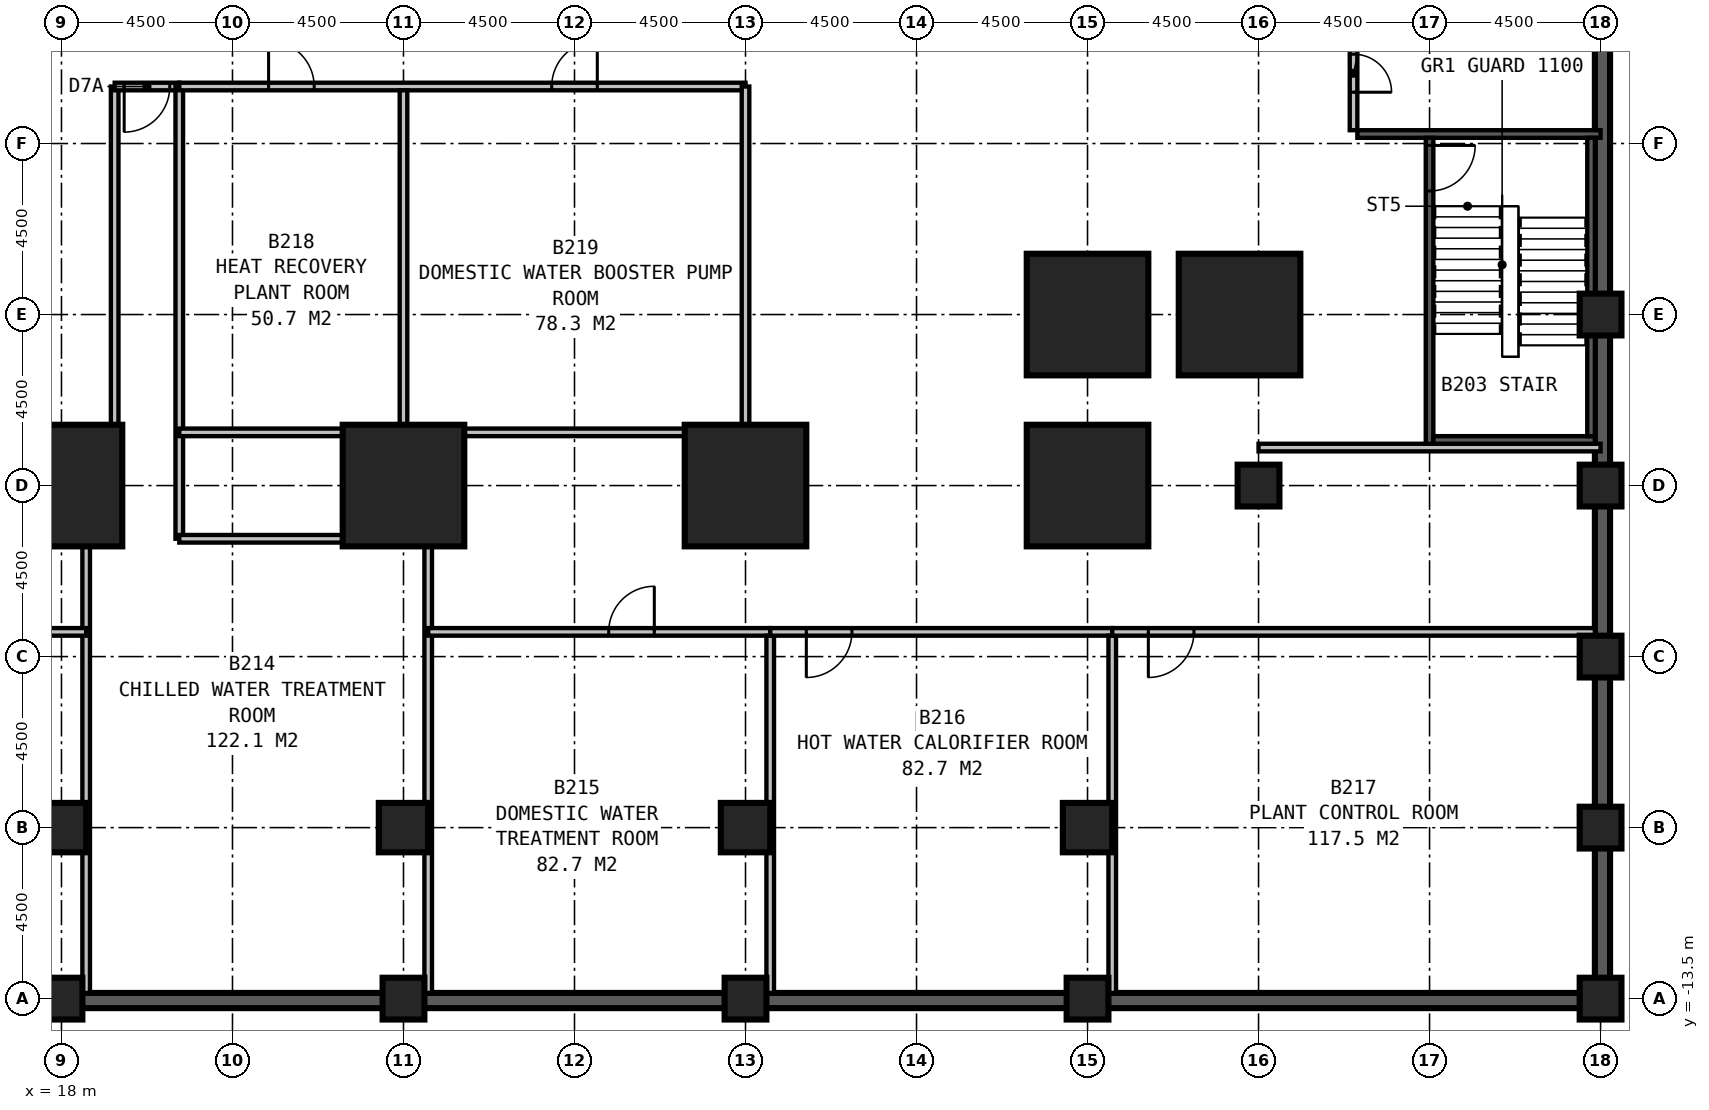
"""IFC4 building model, lengths in metres.
Left out: names, types, materials, properties, quantities, classifications, styles, units other than length and angle.
Written with IfcOpenShell. Run it as: python <this file> out.ifc"""

import sys

from ifc_helpers import new_model, si_unit, direction, frame, frame_2d, origin, origin_2d, place, context, subcontext, project, spatial, rectangle, extrude, element, fill, save


model = new_model("IFC4")
c1 = context("Model", 3, precision=1e-05, world=origin(), true_north=direction((0.0, 1.0)))
c2 = subcontext(c1, "Body", "Model", "MODEL_VIEW")
j1 = project(units=[si_unit("LENGTHUNIT", "METRE"), si_unit("PLANEANGLEUNIT", "RADIAN")], contexts=[c1])
p1 = place(None, origin())
s1 = spatial("IfcSite", under=j1, at=p1, CompositionType="ELEMENT")
p2 = place(p1, origin())
s2 = spatial("IfcBuilding", under=s1, at=p2, CompositionType="ELEMENT")
p3 = place(p2, frame((0.0, 0.0, -9.0)))
s3 = spatial("IfcBuildingStorey", under=s2, at=p3, CompositionType="ELEMENT", Elevation=-9.0)
for number, where, z_axis, x_axis in (
    (1, (18.0, 0.0, 0.0), (0.0, 0.0, 1.0), (1.0, 0.0, 0.0)),
    (2, (27.0, 0.0, 0.0), (0.0, 0.0, 1.0), (1.0, 0.0, 0.0)),
    (3, (36.0, 0.0, 0.0), (0.0, 0.0, 1.0), (1.0, 0.0, 0.0)),
    (4, (45.0, 0.0, 0.0), (0.0, 0.0, 1.0), (1.0, 0.0, 0.0)),
    (5, (45.0, 4.5, 0.0), (0.0, 0.0, 1.0), (1.0, 0.0, 0.0)),
    (6, (49.0, 4.5, 0.0), (0.0, 0.0, 1.0), (1.0, 0.0, 0.0)),
):
    element("IfcColumn", number, at=place(p3, frame(where, z_axis=z_axis, x_axis=x_axis)), inside=s3, PredefinedType="COLUMN", context=c2, shape_type="SweptSolid", body=[
        extrude(rectangle(XDim=3.2, YDim=3.2, at=origin_2d()), origin(), (0.0, 0.0, 1.0), 4.5),
    ])
for number, where, z_axis, x_axis in (
    (7, (58.5, -13.5, -0.6), (0.0, 0.0, 1.0), (1.0, 0.0, 0.0)),
    (8, (58.5, -4.5, -0.6), (0.0, 0.0, 1.0), (1.0, 0.0, 0.0)),
    (9, (58.5, 4.5, -0.6), (0.0, 0.0, 1.0), (1.0, 0.0, 0.0)),
    (10, (58.5, 0.0, -0.6), (0.0, 0.0, 1.0), (1.0, 0.0, 0.0)),
    (11, (18.0, -13.5, -0.6), (0.0, 0.0, 1.0), (1.0, 0.0, 0.0)),
    (12, (27.0, -13.5, -0.6), (0.0, 0.0, 1.0), (1.0, 0.0, 0.0)),
    (13, (36.0, -13.5, -0.6), (0.0, 0.0, 1.0), (1.0, 0.0, 0.0)),
    (14, (45.0, -13.5, -0.6), (0.0, 0.0, 1.0), (1.0, 0.0, 0.0)),
):
    element("IfcColumn", number, at=place(p3, frame(where, z_axis=z_axis, x_axis=x_axis)), inside=s3, PredefinedType="COLUMN", context=c2, shape_type="SweptSolid", body=[
        extrude(rectangle(XDim=1.1, YDim=1.1, at=origin_2d()), origin(), (0.0, 0.0, 1.0), 5.1),
    ])
for number, where, z_axis, x_axis in (
    (15, (18.0, -9.0, -0.6), (0.0, 0.0, 1.0), (1.0, 0.0, 0.0)),
    (16, (27.0, -9.0, -0.6), (0.0, 0.0, 1.0), (1.0, 0.0, 0.0)),
    (17, (36.0, -9.0, -0.6), (0.0, 0.0, 1.0), (1.0, 0.0, 0.0)),
    (18, (45.0, -9.0, -0.6), (0.0, 0.0, 1.0), (1.0, 0.0, 0.0)),
):
    element("IfcColumn", number, at=place(p3, frame(where, z_axis=z_axis, x_axis=x_axis)), inside=s3, PredefinedType="COLUMN", context=c2, shape_type="SweptSolid", body=[
        extrude(rectangle(XDim=1.3, YDim=1.3, at=origin_2d()), origin(), (0.0, 0.0, 1.0), 5.1),
    ])
for number, where, z_axis, x_axis in (
    (19, (58.5, -9.0, -0.6), (0.0, 0.0, 1.0), (1.0, 0.0, 0.0)),
    (20, (49.5, 0.0, -0.6), (0.0, 0.0, 1.0), (1.0, 0.0, 0.0)),
):
    element("IfcColumn", number, at=place(p3, frame(where, z_axis=z_axis, x_axis=x_axis)), inside=s3, PredefinedType="COLUMN", context=c2, shape_type="SweptSolid", body=[
        extrude(rectangle(XDim=1.1, YDim=1.1, at=origin_2d()), origin(), (0.0, 0.0, 1.0), 5.1),
    ])
p4 = place(p3, frame((-18.25, -13.55, -0.6), z_axis=(0.0, 0.0, 1.0), x_axis=(1.0, 0.0, 0.0)))
e21 = element("IfcWall", 21, at=p4, inside=s3, PredefinedType="SOLIDWALL", context=c2, shape_type="SweptSolid", body=[
    extrude(rectangle(XDim=77.0, YDim=0.4, at=frame_2d((38.5, 0.0))), origin(), (0.0, 0.0, 1.0), 5.1),
])
p5 = place(p3, frame((58.55, -13.35, -0.6), z_axis=(0.0, 0.0, 1.0), x_axis=(0.0, 1.0, 0.0)))
e22 = element("IfcWall", 22, at=p5, inside=s3, PredefinedType="SOLIDWALL", context=c2, shape_type="SweptSolid", body=[
    extrude(rectangle(XDim=53.7, YDim=0.4, at=frame_2d((26.85, 0.0))), origin(), (0.0, 0.0, 1.0), 5.1),
])
p6 = place(p3, frame((54.0, 1.1, 0.0), z_axis=(0.0, 0.0, 1.0), x_axis=(0.0, 1.0, 0.0)))
e23 = element("IfcWall", 23, at=p6, inside=s3, PredefinedType="SOLIDWALL", context=c2, shape_type="SweptSolid", body=[
    extrude(rectangle(XDim=8.05, YDim=0.2, at=frame_2d((4.025, 0.0))), origin(), (0.0, 0.0, 1.0), 4.25),
])
p7 = place(p6, frame((7.85, 0.0, 0.0), z_axis=(0.0, 0.0, 1.0), x_axis=(-1.0, 0.0, 0.0)))
e24 = element("IfcOpeningElement", 24, at=p7, cuts=e23, PredefinedType="OPENING", context=c2, shape_type="SweptSolid", body=[
    extrude(rectangle(XDim=1.2, YDim=2.1, at=frame_2d((0.6, 1.05))), frame((0.0, 0.11, 0.0), z_axis=(0.0, -1.0, 0.0), x_axis=(1.0, 0.0, 0.0)), (0.0, 0.0, 1.0), 0.22),
])
p8 = place(p3, frame((52.1, 9.25, 0.0), z_axis=(0.0, 0.0, 1.0), x_axis=(1.0, 0.0, 0.0)))
e25 = element("IfcWall", 25, at=p8, inside=s3, PredefinedType="SOLIDWALL", context=c2, shape_type="SweptSolid", body=[
    extrude(rectangle(XDim=6.4, YDim=0.2, at=frame_2d((3.2, 0.0))), origin(), (0.0, 0.0, 1.0), 4.25),
])
p9 = place(p3, frame((54.1, 1.2, 0.0), z_axis=(0.0, 0.0, 1.0), x_axis=(1.0, 0.0, 0.0)))
e26 = element("IfcWall", 26, at=p9, inside=s3, PredefinedType="SOLIDWALL", context=c2, shape_type="SweptSolid", body=[
    extrude(rectangle(XDim=4.25, YDim=0.2, at=frame_2d((2.125, 0.0))), origin(), (0.0, 0.0, 1.0), 4.25),
])
p10 = place(p3, frame((58.25, 1.3, 0.0), z_axis=(0.0, 0.0, 1.0), x_axis=(0.0, 1.0, 0.0)))
e27 = element("IfcWall", 27, at=p10, inside=s3, PredefinedType="SOLIDWALL", context=c2, shape_type="SweptSolid", body=[
    extrude(rectangle(XDim=2.65, YDim=0.2, at=frame_2d((1.325, 0.0))), origin(), (0.0, 0.0, 1.0), 4.25),
])
p11 = place(p3, frame((58.25, 5.05, 0.0), z_axis=(0.0, 0.0, 1.0), x_axis=(0.0, 1.0, 0.0)))
e28 = element("IfcWall", 28, at=p11, inside=s3, PredefinedType="SOLIDWALL", context=c2, shape_type="SweptSolid", body=[
    extrude(rectangle(XDim=4.1, YDim=0.2, at=frame_2d((2.05, 0.0))), origin(), (0.0, 0.0, 1.0), 4.25),
])
p12 = place(p3, frame((52.0, 9.35, 0.0), z_axis=(0.0, 0.0, 1.0), x_axis=(0.0, 1.0, 0.0)))
e29 = element("IfcWall", 29, at=p12, inside=s3, PredefinedType="PARTITIONING", context=c2, shape_type="SweptSolid", body=[
    extrude(rectangle(XDim=31.15, YDim=0.2, at=frame_2d((15.575, 0.0))), origin(), (0.0, 0.0, 1.0), 4.25),
])
p13 = place(p12, frame((2.0, 0.0, 0.0), z_axis=(0.0, 0.0, 1.0), x_axis=(-1.0, 0.0, 0.0)))
e30 = element("IfcOpeningElement", 30, at=p13, cuts=e29, PredefinedType="OPENING", context=c2, shape_type="SweptSolid", body=[
    extrude(rectangle(XDim=1.0, YDim=2.1, at=frame_2d((0.5, 1.05))), frame((0.0, 0.11, 0.0), z_axis=(0.0, -1.0, 0.0), x_axis=(1.0, 0.0, 0.0)), (0.0, 0.0, 1.0), 0.22),
])
p14 = place(p12, frame((10.75, 0.0, 0.0), z_axis=(0.0, 0.0, 1.0), x_axis=(-1.0, 0.0, 0.0)))
e31 = element("IfcOpeningElement", 31, at=p14, cuts=e29, PredefinedType="OPENING", context=c2, shape_type="SweptSolid", body=[
    extrude(rectangle(XDim=1.0, YDim=2.1, at=frame_2d((0.5, 1.05))), frame((0.0, 0.11, 0.0), z_axis=(0.0, -1.0, 0.0), x_axis=(1.0, 0.0, 0.0)), (0.0, 0.0, 1.0), 0.22),
])
p15 = place(p12, frame((17.55, 0.0, 0.0), z_axis=(0.0, 0.0, 1.0), x_axis=(-1.0, 0.0, 0.0)))
e32 = element("IfcOpeningElement", 32, at=p15, cuts=e29, PredefinedType="OPENING", context=c2, shape_type="SweptSolid", body=[
    extrude(rectangle(XDim=1.0, YDim=2.1, at=frame_2d((0.5, 1.05))), frame((0.0, 0.11, 0.0), z_axis=(0.0, -1.0, 0.0), x_axis=(1.0, 0.0, 0.0)), (0.0, 0.0, 1.0), 0.22),
])
p16 = place(p3, frame((49.5, 1.0, 0.0), z_axis=(0.0, 0.0, 1.0), x_axis=(1.0, 0.0, 0.0)))
e33 = element("IfcWall", 33, at=p16, inside=s3, PredefinedType="PARTITIONING", context=c2, shape_type="SweptSolid", body=[
    extrude(rectangle(XDim=9.0, YDim=0.2, at=frame_2d((4.5, 0.0))), origin(), (0.0, 0.0, 1.0), 4.25),
])
for number, where, z_axis, x_axis in (
    (34, (36.65, -13.35, 0.0), (0.0, 0.0, 1.0), (0.0, 1.0, 0.0)),
    (35, (45.65, -13.35, 0.0), (0.0, 0.0, 1.0), (0.0, 1.0, 0.0)),
):
    element("IfcWall", number, at=place(p3, frame(where, z_axis=z_axis, x_axis=x_axis)), inside=s3, PredefinedType="PARTITIONING", context=c2, shape_type="SweptSolid", body=[
        extrude(rectangle(XDim=9.4, YDim=0.2, at=frame_2d((4.7, 0.0))), origin(), (0.0, 0.0, 1.0), 3.3),
    ])
for number, where, z_axis, x_axis in (
    (36, (18.65, -13.35, 0.0), (0.0, 0.0, 1.0), (0.0, 1.0, 0.0)),
    (37, (27.65, -13.35, 0.0), (0.0, 0.0, 1.0), (0.0, 1.0, 0.0)),
):
    element("IfcWall", number, at=place(p3, frame(where, z_axis=z_axis, x_axis=x_axis)), inside=s3, PredefinedType="PARTITIONING", context=c2, shape_type="SweptSolid", body=[
        extrude(rectangle(XDim=11.85, YDim=0.2, at=frame_2d((5.925, 0.0))), origin(), (0.0, 0.0, 1.0), 3.3),
    ])
p17 = place(p3, frame((9.65, -3.85, 0.0), z_axis=(0.0, 0.0, 1.0), x_axis=(1.0, 0.0, 0.0)))
e38 = element("IfcWall", 38, at=p17, inside=s3, PredefinedType="PARTITIONING", context=c2, shape_type="SweptSolid", body=[
    extrude(rectangle(XDim=9.0, YDim=0.2, at=frame_2d((4.5, 0.0))), origin(), (0.0, 0.0, 1.0), 4.25),
])
p18 = place(p17, frame((3.75, 0.0, 0.0)))
e39 = element("IfcOpeningElement", 39, at=p18, cuts=e38, PredefinedType="OPENING", context=c2, shape_type="SweptSolid", body=[
    extrude(rectangle(XDim=1.2, YDim=2.1, at=frame_2d((0.6, 1.05))), frame((0.0, 0.11, 0.0), z_axis=(0.0, -1.0, 0.0), x_axis=(1.0, 0.0, 0.0)), (0.0, 0.0, 1.0), 0.22),
])
p19 = place(p3, frame((18.65, -1.4, 0.0), z_axis=(0.0, 0.0, 1.0), x_axis=(1.0, 0.0, 0.0)))
e40 = element("IfcWall", 40, at=p19, inside=s3, PredefinedType="PARTITIONING", context=c2, shape_type="SweptSolid", body=[
    extrude(rectangle(XDim=0.75, YDim=0.2, at=frame_2d((0.375, 0.0))), origin(), (0.0, 0.0, 1.0), 4.25),
])
p20 = place(p3, frame((21.1, -1.4, 0.0), z_axis=(0.0, 0.0, 1.0), x_axis=(1.0, 0.0, 0.0)))
e41 = element("IfcWall", 41, at=p20, inside=s3, PredefinedType="PARTITIONING", context=c2, shape_type="SweptSolid", body=[
    extrude(rectangle(XDim=6.55, YDim=0.2, at=frame_2d((3.275, 0.0))), origin(), (0.0, 0.0, 1.0), 4.25),
])
p21 = place(p3, frame((27.65, -3.85, 0.0), z_axis=(0.0, 0.0, 1.0), x_axis=(1.0, 0.0, 0.0)))
e42 = element("IfcWall", 42, at=p21, inside=s3, PredefinedType="PARTITIONING", context=c2, shape_type="SweptSolid", body=[
    extrude(rectangle(XDim=9.0, YDim=0.2, at=frame_2d((4.5, 0.0))), origin(), (0.0, 0.0, 1.0), 4.25),
])
p22 = place(p21, frame((4.75, 0.0, 0.0)))
e43 = element("IfcOpeningElement", 43, at=p22, cuts=e42, PredefinedType="OPENING", context=c2, shape_type="SweptSolid", body=[
    extrude(rectangle(XDim=1.2, YDim=2.1, at=frame_2d((0.6, 1.05))), frame((0.0, 0.11, 0.0), z_axis=(0.0, -1.0, 0.0), x_axis=(1.0, 0.0, 0.0)), (0.0, 0.0, 1.0), 0.22),
])
p23 = place(p3, frame((36.65, -3.85, 0.0), z_axis=(0.0, 0.0, 1.0), x_axis=(1.0, 0.0, 0.0)))
e44 = element("IfcWall", 44, at=p23, inside=s3, PredefinedType="PARTITIONING", context=c2, shape_type="SweptSolid", body=[
    extrude(rectangle(XDim=9.0, YDim=0.2, at=frame_2d((4.5, 0.0))), origin(), (0.0, 0.0, 1.0), 4.25),
])
p24 = place(p23, frame((2.15, 0.0, 0.0), z_axis=(0.0, 0.0, 1.0), x_axis=(-1.0, 0.0, 0.0)))
e45 = element("IfcOpeningElement", 45, at=p24, cuts=e44, PredefinedType="OPENING", context=c2, shape_type="SweptSolid", body=[
    extrude(rectangle(XDim=1.2, YDim=2.1, at=frame_2d((0.6, 1.05))), frame((0.0, 0.11, 0.0), z_axis=(0.0, -1.0, 0.0), x_axis=(1.0, 0.0, 0.0)), (0.0, 0.0, 1.0), 0.22),
])
p25 = place(p3, frame((45.65, -3.85, 0.0), z_axis=(0.0, 0.0, 1.0), x_axis=(1.0, 0.0, 0.0)))
e46 = element("IfcWall", 46, at=p25, inside=s3, PredefinedType="PARTITIONING", context=c2, shape_type="SweptSolid", body=[
    extrude(rectangle(XDim=12.7, YDim=0.2, at=frame_2d((6.35, 0.0))), origin(), (0.0, 0.0, 1.0), 4.25),
])
p26 = place(p25, frame((2.15, 0.0, 0.0), z_axis=(0.0, 0.0, 1.0), x_axis=(-1.0, 0.0, 0.0)))
e47 = element("IfcOpeningElement", 47, at=p26, cuts=e46, PredefinedType="OPENING", context=c2, shape_type="SweptSolid", body=[
    extrude(rectangle(XDim=1.2, YDim=2.1, at=frame_2d((0.6, 1.05))), frame((0.0, 0.11, 0.0), z_axis=(0.0, -1.0, 0.0), x_axis=(1.0, 0.0, 0.0)), (0.0, 0.0, 1.0), 0.22),
])
for number, where, z_axis, x_axis in (
    (48, (19.4, -1.4, 0.0), (0.0, 0.0, 1.0), (0.0, 1.0, 0.0)),
    (49, (21.1, -1.4, 0.0), (0.0, 0.0, 1.0), (0.0, 1.0, 0.0)),
):
    element("IfcWall", number, at=place(p3, frame(where, z_axis=z_axis, x_axis=x_axis)), inside=s3, PredefinedType="PARTITIONING", context=c2, shape_type="SweptSolid", body=[
        extrude(rectangle(XDim=11.9, YDim=0.2, at=frame_2d((5.95, 0.0))), origin(), (0.0, 0.0, 1.0), 4.25),
    ])
p27 = place(p3, frame((27.0, 1.4, 0.0), z_axis=(0.0, 0.0, 1.0), x_axis=(0.0, 1.0, 0.0)))
e50 = element("IfcWall", 50, at=p27, inside=s3, PredefinedType="PARTITIONING", context=c2, shape_type="SweptSolid", body=[
    extrude(rectangle(XDim=9.0, YDim=0.2, at=frame_2d((4.5, 0.0))), origin(), (0.0, 0.0, 1.0), 3.2),
])
p28 = place(p3, frame((36.0, 1.4, 0.0), z_axis=(0.0, 0.0, 1.0), x_axis=(0.0, 1.0, 0.0)))
e51 = element("IfcWall", 51, at=p28, inside=s3, PredefinedType="PARTITIONING", context=c2, shape_type="SweptSolid", body=[
    extrude(rectangle(XDim=9.1, YDim=0.2, at=frame_2d((4.55, 0.0))), origin(), (0.0, 0.0, 1.0), 3.2),
])
p29 = place(p3, frame((21.1, 1.4, 0.0), z_axis=(0.0, 0.0, 1.0), x_axis=(1.0, 0.0, 0.0)))
e52 = element("IfcWall", 52, at=p29, inside=s3, PredefinedType="PARTITIONING", context=c2, shape_type="SweptSolid", body=[
    extrude(rectangle(XDim=14.9, YDim=0.2, at=frame_2d((7.45, 0.0))), origin(), (0.0, 0.0, 1.0), 4.25),
])
p30 = place(p3, frame((21.1, 10.5, 0.0), z_axis=(0.0, 0.0, 1.0), x_axis=(1.0, 0.0, 0.0)))
e53 = element("IfcWall", 53, at=p30, inside=s3, PredefinedType="PARTITIONING", context=c2, shape_type="SweptSolid", body=[
    extrude(rectangle(XDim=14.9, YDim=0.2, at=frame_2d((7.45, 0.0))), origin(), (0.0, 0.0, 1.0), 4.25),
])
p31 = place(p30, frame((2.35, 0.0, 0.0)))
e54 = element("IfcOpeningElement", 54, at=p31, cuts=e53, PredefinedType="OPENING", context=c2, shape_type="SweptSolid", body=[
    extrude(rectangle(XDim=1.2, YDim=2.1, at=frame_2d((0.6, 1.05))), frame((0.0, 0.11, 0.0), z_axis=(0.0, -1.0, 0.0), x_axis=(1.0, 0.0, 0.0)), (0.0, 0.0, 1.0), 0.22),
])
p32 = place(p30, frame((9.8, 0.0, 0.0)))
e55 = element("IfcOpeningElement", 55, at=p32, cuts=e53, PredefinedType="OPENING", context=c2, shape_type="SweptSolid", body=[
    extrude(rectangle(XDim=1.2, YDim=2.1, at=frame_2d((0.6, 1.05))), frame((0.0, 0.11, 0.0), z_axis=(0.0, -1.0, 0.0), x_axis=(1.0, 0.0, 0.0)), (0.0, 0.0, 1.0), 0.22),
])
p33 = place(p3, frame((19.4, 10.5, 0.0), z_axis=(0.0, 0.0, 1.0), x_axis=(1.0, 0.0, 0.0)))
e56 = element("IfcWall", 56, at=p33, inside=s3, PredefinedType="PARTITIONING", context=c2, shape_type="SweptSolid", body=[
    extrude(rectangle(XDim=1.7, YDim=0.2, at=frame_2d((0.85, 0.0))), origin(), (0.0, 0.0, 1.0), 4.25),
])
p34 = place(p33, frame((1.45, 0.0, 0.0), z_axis=(0.0, 0.0, 1.0), x_axis=(-1.0, 0.0, 0.0)))
e57 = element("IfcOpeningElement", 57, at=p34, cuts=e56, PredefinedType="OPENING", context=c2, shape_type="SweptSolid", body=[
    extrude(rectangle(XDim=1.2, YDim=2.1, at=frame_2d((0.6, 1.05))), frame((0.0, 0.11, 0.0), z_axis=(0.0, -1.0, 0.0), x_axis=(1.0, 0.0, 0.0)), (0.0, 0.0, 1.0), 0.22),
])
p35 = place(p7, origin())
e58 = element("IfcDoor", 58, at=p35, inside=s3, OperationType="SINGLE_SWING_LEFT", PredefinedType="DOOR", context=c2, shape_type="SweptSolid", body=[
    extrude(rectangle(XDim=1.2, YDim=2.1, at=frame_2d((0.6, 1.05))), frame((0.0, 0.025, 0.0), z_axis=(0.0, -1.0, 0.0), x_axis=(1.0, 0.0, 0.0)), (0.0, 0.0, 1.0), 0.05),
])
fill(e24, e58)
p36 = place(p13, origin())
e59 = element("IfcDoor", 59, at=p36, inside=s3, OperationType="SINGLE_SWING_RIGHT", PredefinedType="DOOR", context=c2, shape_type="SweptSolid", body=[
    extrude(rectangle(XDim=1.0, YDim=2.1, at=frame_2d((0.5, 1.05))), frame((0.0, 0.025, 0.0), z_axis=(0.0, -1.0, 0.0), x_axis=(1.0, 0.0, 0.0)), (0.0, 0.0, 1.0), 0.05),
])
fill(e30, e59)
p37 = place(p22, origin())
e60 = element("IfcDoor", 60, at=p37, inside=s3, OperationType="SINGLE_SWING_RIGHT", PredefinedType="DOOR", context=c2, shape_type="SweptSolid", body=[
    extrude(rectangle(XDim=1.2, YDim=2.1, at=frame_2d((0.6, 1.05))), frame((0.0, 0.025, 0.0), z_axis=(0.0, -1.0, 0.0), x_axis=(1.0, 0.0, 0.0)), (0.0, 0.0, 1.0), 0.05),
])
fill(e43, e60)
p38 = place(p24, origin())
e61 = element("IfcDoor", 61, at=p38, inside=s3, OperationType="SINGLE_SWING_RIGHT", PredefinedType="DOOR", context=c2, shape_type="SweptSolid", body=[
    extrude(rectangle(XDim=1.2, YDim=2.1, at=frame_2d((0.6, 1.05))), frame((0.0, 0.025, 0.0), z_axis=(0.0, -1.0, 0.0), x_axis=(1.0, 0.0, 0.0)), (0.0, 0.0, 1.0), 0.05),
])
fill(e45, e61)
p39 = place(p26, origin())
e62 = element("IfcDoor", 62, at=p39, inside=s3, OperationType="SINGLE_SWING_RIGHT", PredefinedType="DOOR", context=c2, shape_type="SweptSolid", body=[
    extrude(rectangle(XDim=1.2, YDim=2.1, at=frame_2d((0.6, 1.05))), frame((0.0, 0.025, 0.0), z_axis=(0.0, -1.0, 0.0), x_axis=(1.0, 0.0, 0.0)), (0.0, 0.0, 1.0), 0.05),
])
fill(e47, e62)
p40 = place(p31, origin())
e63 = element("IfcDoor", 63, at=p40, inside=s3, OperationType="SINGLE_SWING_LEFT", PredefinedType="DOOR", context=c2, shape_type="SweptSolid", body=[
    extrude(rectangle(XDim=1.2, YDim=2.1, at=frame_2d((0.6, 1.05))), frame((0.0, 0.025, 0.0), z_axis=(0.0, -1.0, 0.0), x_axis=(1.0, 0.0, 0.0)), (0.0, 0.0, 1.0), 0.05),
])
fill(e54, e63)
p41 = place(p32, origin())
e64 = element("IfcDoor", 64, at=p41, inside=s3, OperationType="SINGLE_SWING_RIGHT", PredefinedType="DOOR", context=c2, shape_type="SweptSolid", body=[
    extrude(rectangle(XDim=1.2, YDim=2.1, at=frame_2d((0.6, 1.05))), frame((0.0, 0.025, 0.0), z_axis=(0.0, -1.0, 0.0), x_axis=(1.0, 0.0, 0.0)), (0.0, 0.0, 1.0), 0.05),
])
fill(e55, e64)
p42 = place(p34, origin())
e65 = element("IfcDoor", 65, at=p42, inside=s3, OperationType="SINGLE_SWING_RIGHT", PredefinedType="DOOR", context=c2, shape_type="SweptSolid", body=[
    extrude(rectangle(XDim=1.2, YDim=2.1, at=frame_2d((0.6, 1.05))), frame((0.0, 0.025, 0.0), z_axis=(0.0, -1.0, 0.0), x_axis=(1.0, 0.0, 0.0)), (0.0, 0.0, 1.0), 0.05),
])
fill(e57, e65)
save(model, sys.argv[1])
